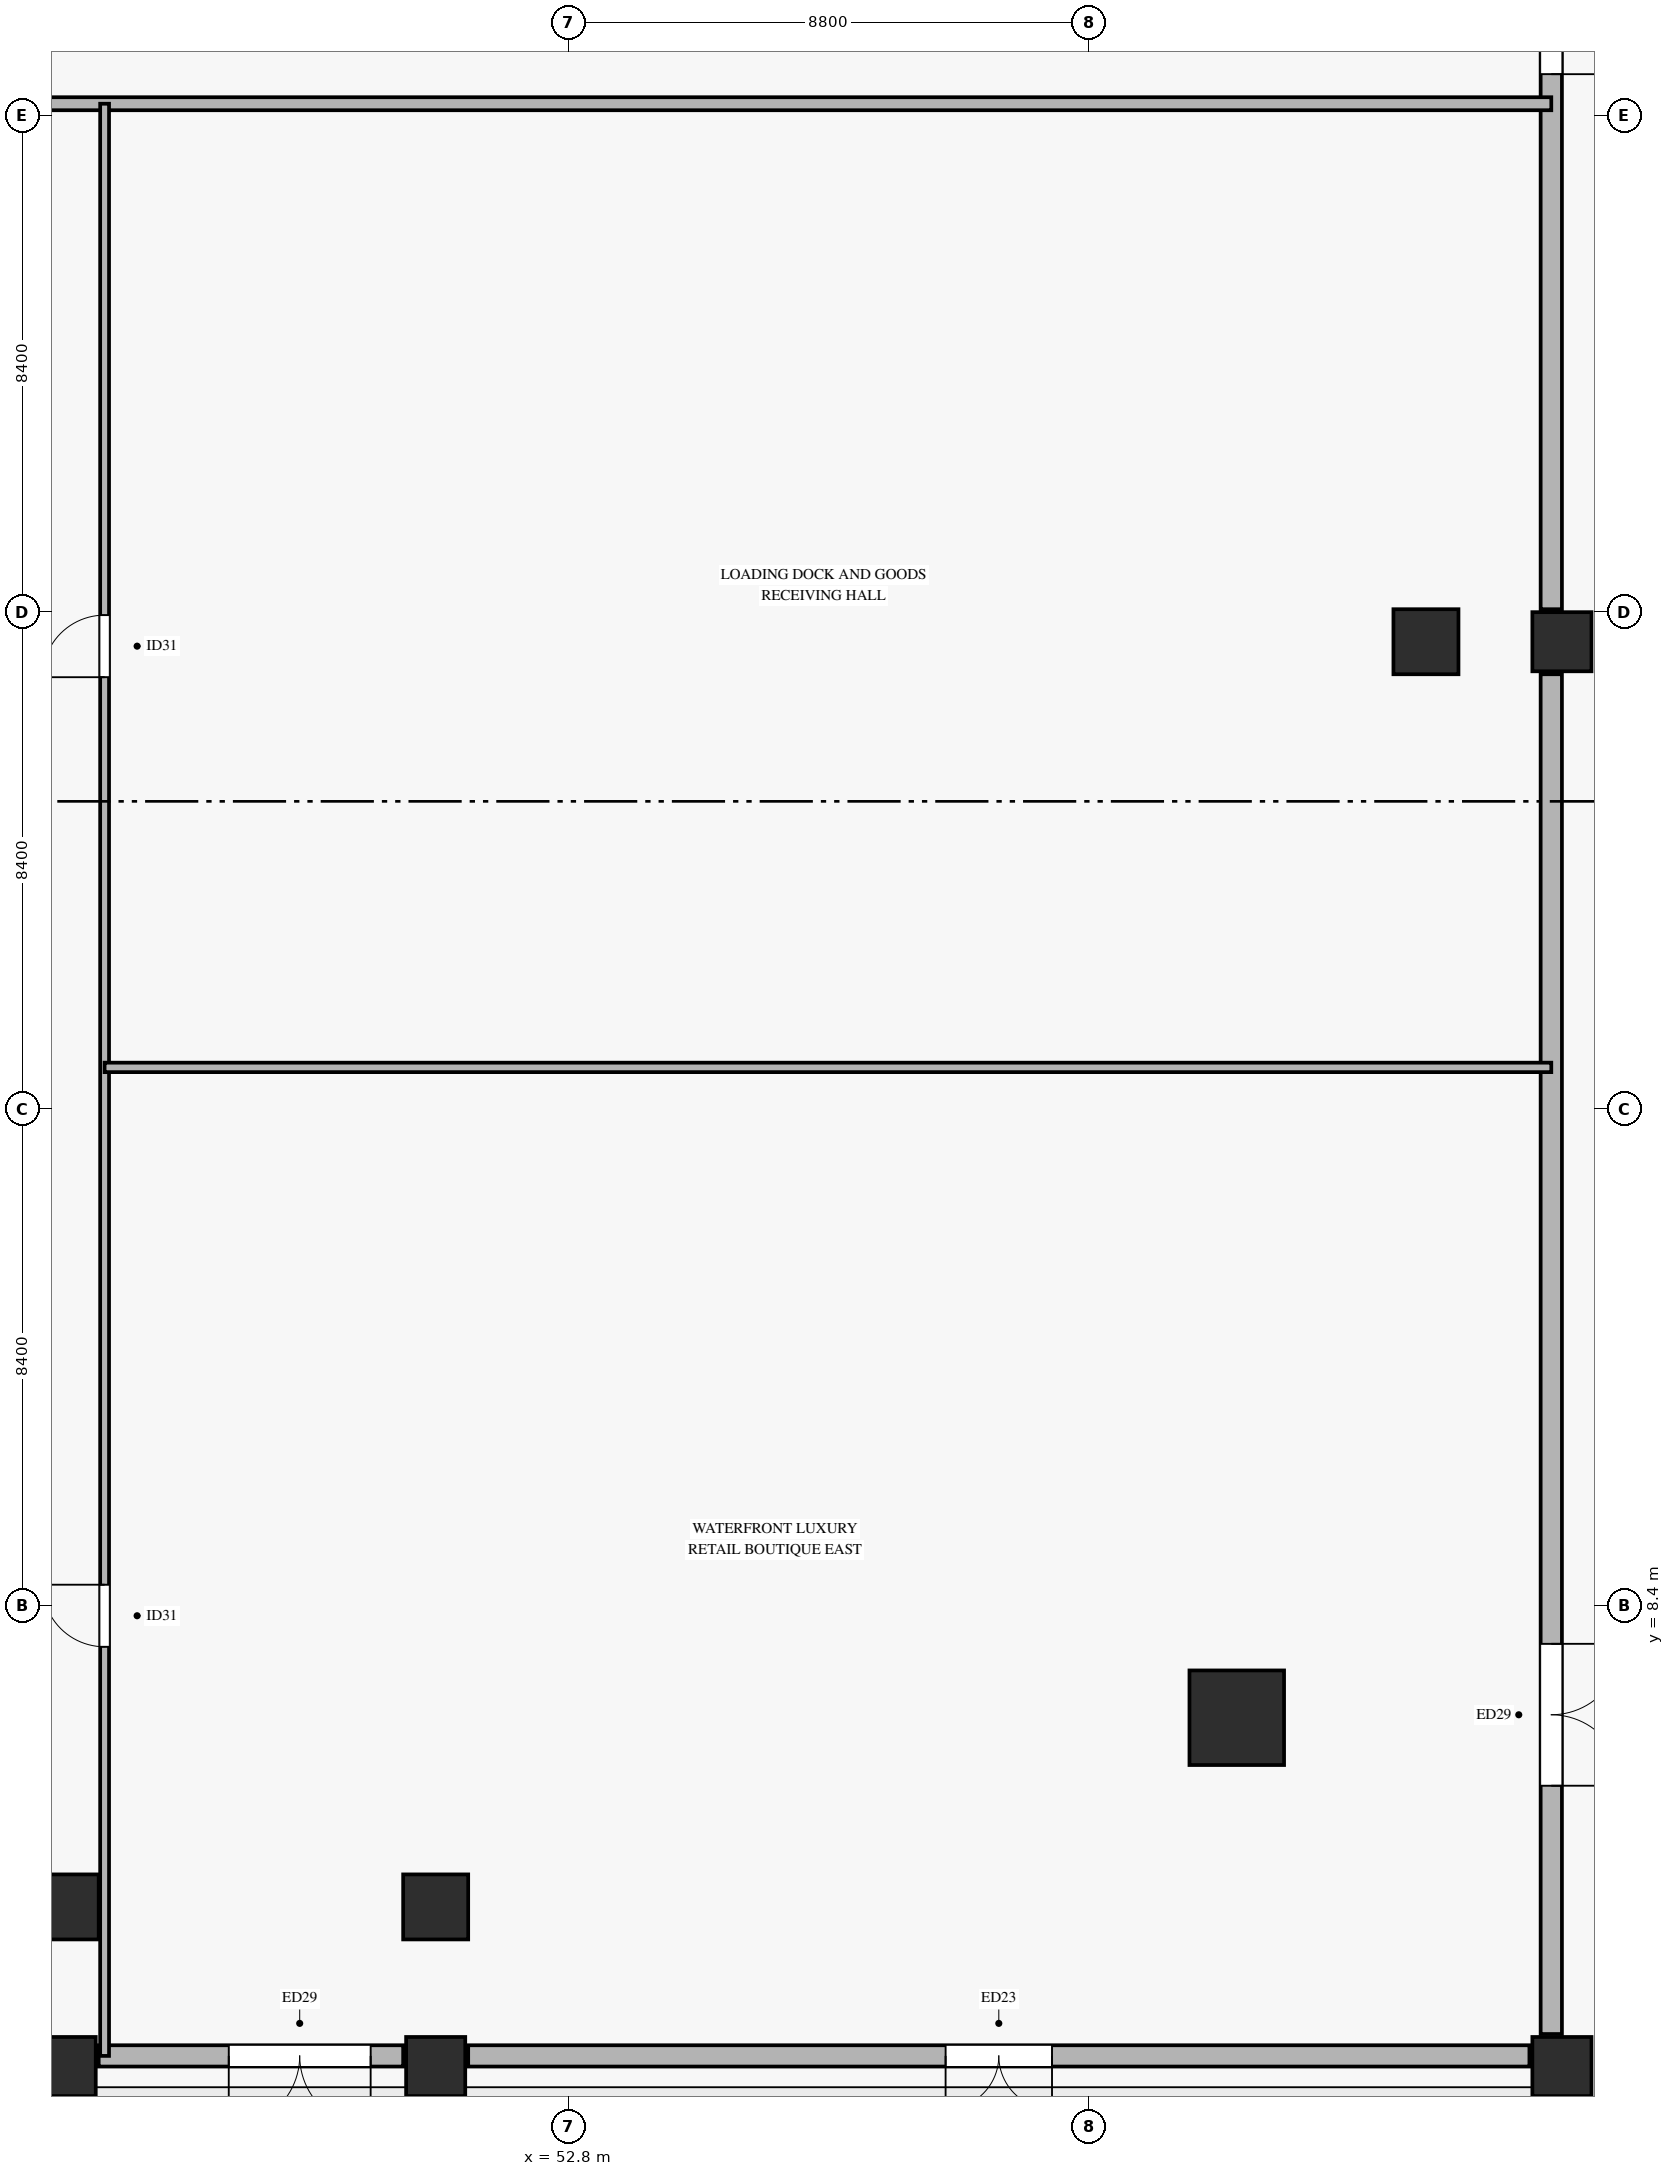
"""IFC4 building model, lengths in metres.
Left out: names, types, materials, properties, quantities, classifications, styles, units other than length and angle.
Written with IfcOpenShell. Run it as: python <this file> out.ifc"""

import sys

from ifc_helpers import new_model, si_unit, direction, frame, frame_2d, origin, origin_2d, place, context, subcontext, project, spatial, rectangle, hollow_rectangle, extrude, source, transform, mapped, element, fill, save


model = new_model("IFC4")
c1 = context("Model", 3, precision=1e-05, world=origin(), true_north=direction((0.0, 1.0)))
c2 = subcontext(c1, "Body", "Model", "MODEL_VIEW")
j1 = project(units=[si_unit("LENGTHUNIT", "METRE"), si_unit("PLANEANGLEUNIT", "RADIAN")], contexts=[c1])
p1 = place(None, origin())
s1 = spatial("IfcSite", under=j1, at=p1, CompositionType="ELEMENT")
p2 = place(p1, origin())
s2 = spatial("IfcBuilding", under=s1, at=p2, CompositionType="ELEMENT")
p3 = place(p2, origin())
s3 = spatial("IfcBuildingStorey", under=s2, at=p3, CompositionType="ELEMENT", Elevation=0.0)
m1 = source(origin(), c2, "Body", "SweptSolid", [
    extrude(hollow_rectangle(XDim=1.6, YDim=1.6, WallThickness=0.075, at=origin_2d()), origin(), (0.0, 0.0, 1.0), 5.34),
])
p4 = place(p3, frame((64.1, 6.5, 0.0), z_axis=(0.0, 0.0, 1.0), x_axis=(1.0, 0.0, 0.0)))
e1 = element("IfcColumn", 1, at=p4, inside=s3, PredefinedType="COLUMN", context=c2, shape_type="MappedRepresentation", body=[
    mapped(m1, transform((0.0, 0.0, 0.0), x_axis=(1.0, 0.0, 0.0), y_axis=(0.0, 1.0, 0.0), z_axis=(0.0, 0.0, 1.0), scale=1.0)),
])
m2 = source(origin(), c2, "Body", "SweptSolid", [
    extrude(hollow_rectangle(XDim=1.1, YDim=1.1, WallThickness=0.05, at=origin_2d()), origin(), (0.0, 0.0, 1.0), 5.34),
])
for number, where, z_axis, x_axis in (
    (2, (44.3, 3.3, 0.0), (0.0, 0.0, 1.0), (1.0, 0.0, 0.0)),
    (3, (50.55, 3.3, 0.0), (0.0, 0.0, 1.0), (1.0, 0.0, 0.0)),
    (4, (67.3, 24.7, 0.0), (0.0, 0.0, 1.0), (1.0, 0.0, 0.0)),
):
    element("IfcColumn", number, at=place(p3, frame(where, z_axis=z_axis, x_axis=x_axis)), inside=s3, PredefinedType="COLUMN", context=c2, shape_type="MappedRepresentation", body=[
        mapped(m2, transform((0.0, 0.0, 0.0), x_axis=(1.0, 0.0, 0.0), y_axis=(0.0, 1.0, 0.0), z_axis=(0.0, 0.0, 1.0), scale=1.0)),
    ])
m3 = source(origin(), c2, "Body", "SweptSolid", [
    extrude(hollow_rectangle(XDim=1.0, YDim=1.0, WallThickness=0.045, at=origin_2d()), origin(), (0.0, 0.0, 1.0), 5.34),
])
for number, where, z_axis, x_axis in (
    (5, (44.3, 0.6, 0.0), (0.0, 0.0, 1.0), (1.0, 0.0, 0.0)),
    (6, (50.55, 0.6, 0.0), (0.0, 0.0, 1.0), (1.0, 0.0, 0.0)),
    (7, (69.6, 0.6, 0.0), (0.0, 0.0, 1.0), (1.0, 0.0, 0.0)),
    (8, (69.6, 24.7, 0.0), (0.0, 0.0, 1.0), (1.0, 0.0, 0.0)),
):
    element("IfcColumn", number, at=place(p3, frame(where, z_axis=z_axis, x_axis=x_axis)), inside=s3, PredefinedType="COLUMN", context=c2, shape_type="MappedRepresentation", body=[
        mapped(m3, transform((0.0, 0.0, 0.0), x_axis=(1.0, 0.0, 0.0), y_axis=(0.0, 1.0, 0.0), z_axis=(0.0, 0.0, 1.0), scale=1.0)),
    ])
p5 = place(p3, frame((44.85, 0.78, 0.0), z_axis=(0.0, 0.0, 1.0), x_axis=(1.0, 0.0, 0.0)))
e9 = element("IfcWall", 9, at=p5, inside=s3, PredefinedType="SOLIDWALL", context=c2, shape_type="SweptSolid", body=[
    extrude(rectangle(XDim=5.15, YDim=0.36, at=frame_2d((2.575, 0.0))), origin(), (0.0, 0.0, 1.0), 4.22),
])
p6 = place(p5, frame((2.2, 0.0, 0.0)))
e10 = element("IfcOpeningElement", 10, at=p6, cuts=e9, PredefinedType="OPENING", context=c2, shape_type="SweptSolid", body=[
    extrude(rectangle(XDim=2.4, YDim=2.6, at=frame_2d((1.2, 1.3))), frame((0.0, 0.19, 0.0), z_axis=(0.0, -1.0, 0.0), x_axis=(1.0, 0.0, 0.0)), (0.0, 0.0, 1.0), 0.38),
])
p7 = place(p3, frame((51.1, 0.78, 0.0), z_axis=(0.0, 0.0, 1.0), x_axis=(1.0, 0.0, 0.0)))
e11 = element("IfcWall", 11, at=p7, inside=s3, PredefinedType="SOLIDWALL", context=c2, shape_type="SweptSolid", body=[
    extrude(rectangle(XDim=17.95, YDim=0.36, at=frame_2d((8.975, 0.0))), origin(), (0.0, 0.0, 1.0), 4.22),
])
p8 = place(p7, frame((8.075, 0.0, 0.0)))
e12 = element("IfcOpeningElement", 12, at=p8, cuts=e11, PredefinedType="OPENING", context=c2, shape_type="SweptSolid", body=[
    extrude(rectangle(XDim=1.8, YDim=2.4, at=frame_2d((0.9, 1.2))), frame((0.0, 0.19, 0.0), z_axis=(0.0, -1.0, 0.0), x_axis=(1.0, 0.0, 0.0)), (0.0, 0.0, 1.0), 0.38),
])
p9 = place(p3, frame((69.42, 1.15, 0.0), z_axis=(0.0, 0.0, 1.0), x_axis=(0.0, 1.0, 0.0)))
e13 = element("IfcWall", 13, at=p9, inside=s3, PredefinedType="SOLIDWALL", context=c2, shape_type="SweptSolid", body=[
    extrude(rectangle(XDim=23.0, YDim=0.36, at=frame_2d((11.5, 0.0))), origin(), (0.0, 0.0, 1.0), 4.22),
])
p10 = place(p9, frame((4.2, 0.0, 0.0)))
e14 = element("IfcOpeningElement", 14, at=p10, cuts=e13, PredefinedType="OPENING", context=c2, shape_type="SweptSolid", body=[
    extrude(rectangle(XDim=2.4, YDim=2.6, at=frame_2d((1.2, 1.3))), frame((0.0, 0.19, 0.0), z_axis=(0.0, -1.0, 0.0), x_axis=(1.0, 0.0, 0.0)), (0.0, 0.0, 1.0), 0.38),
])
p11 = place(p3, frame((69.42, 25.25, 0.0), z_axis=(0.0, 0.0, 1.0), x_axis=(0.0, 1.0, 0.0)))
e15 = element("IfcWall", 15, at=p11, inside=s3, PredefinedType="SOLIDWALL", context=c2, shape_type="SweptSolid", body=[
    extrude(rectangle(XDim=11.65, YDim=0.36, at=frame_2d((5.825, 0.0))), origin(), (0.0, 0.0, 1.0), 4.22),
])
p12 = place(p11, frame((9.05, 0.0, 0.0)))
e16 = element("IfcOpeningElement", 16, at=p12, cuts=e15, PredefinedType="OPENING", context=c2, shape_type="SweptSolid", body=[
    extrude(rectangle(XDim=2.4, YDim=2.6, at=frame_2d((1.2, 1.3))), frame((0.0, 0.19, 0.0), z_axis=(0.0, -1.0, 0.0), x_axis=(1.0, 0.0, 0.0)), (0.0, 0.0, 1.0), 0.38),
])
p13 = place(p3, frame((0.98, 33.8, 0.0), z_axis=(0.0, 0.0, 1.0), x_axis=(1.0, 0.0, 0.0)))
e17 = element("IfcWall", 17, at=p13, inside=s3, PredefinedType="SOLIDWALL", context=c2, shape_type="SweptSolid", body=[
    extrude(rectangle(XDim=68.44, YDim=0.22, at=frame_2d((34.22, 0.0))), origin(), (0.0, 0.0, 1.0), 4.225),
])
p14 = place(p13, frame((25.27, 0.0, 0.0)))
e18 = element("IfcOpeningElement", 18, at=p14, cuts=e17, PredefinedType="OPENING", context=c2, shape_type="SweptSolid", body=[
    extrude(rectangle(XDim=1.2, YDim=2.15, at=frame_2d((0.6, 1.075))), frame((0.0, 0.12, 0.0), z_axis=(0.0, -1.0, 0.0), x_axis=(1.0, 0.0, 0.0)), (0.0, 0.0, 1.0), 0.24),
])
p15 = place(p13, frame((38.22, 0.0, 0.0)))
e19 = element("IfcOpeningElement", 19, at=p15, cuts=e17, PredefinedType="OPENING", context=c2, shape_type="SweptSolid", body=[
    extrude(rectangle(XDim=1.2, YDim=2.15, at=frame_2d((0.6, 1.075))), frame((0.0, 0.12, 0.0), z_axis=(0.0, -1.0, 0.0), x_axis=(1.0, 0.0, 0.0)), (0.0, 0.0, 1.0), 0.24),
])
p16 = place(p13, frame((2.82, 0.0, 0.0)))
e20 = element("IfcOpeningElement", 20, at=p16, cuts=e17, PredefinedType="OPENING", context=c2, shape_type="SweptSolid", body=[
    extrude(rectangle(XDim=1.05, YDim=2.15, at=frame_2d((0.525, 1.075))), frame((0.0, 0.12, 0.0), z_axis=(0.0, -1.0, 0.0), x_axis=(1.0, 0.0, 0.0)), (0.0, 0.0, 1.0), 0.24),
])
p17 = place(p3, frame((44.95, 0.78, 0.0), z_axis=(0.0, 0.0, 1.0), x_axis=(0.0, 1.0, 0.0)))
e21 = element("IfcWall", 21, at=p17, inside=s3, PredefinedType="PARTITIONING", context=c2, shape_type="SweptSolid", body=[
    extrude(rectangle(XDim=33.02, YDim=0.15, at=frame_2d((16.51, 0.0))), origin(), (0.0, 0.0, 1.0), 4.225),
])
p18 = place(p17, frame((6.92, 0.0, 0.0)))
e22 = element("IfcOpeningElement", 22, at=p18, cuts=e21, PredefinedType="OPENING", context=c2, shape_type="SweptSolid", body=[
    extrude(rectangle(XDim=1.05, YDim=2.15, at=frame_2d((0.525, 1.075))), frame((0.0, 0.085, 0.0), z_axis=(0.0, -1.0, 0.0), x_axis=(1.0, 0.0, 0.0)), (0.0, 0.0, 1.0), 0.17),
])
p19 = place(p17, frame((23.32, 0.0, 0.0)))
e23 = element("IfcOpeningElement", 23, at=p19, cuts=e21, PredefinedType="OPENING", context=c2, shape_type="SweptSolid", body=[
    extrude(rectangle(XDim=1.05, YDim=2.15, at=frame_2d((0.525, 1.075))), frame((0.0, 0.085, 0.0), z_axis=(0.0, -1.0, 0.0), x_axis=(1.0, 0.0, 0.0)), (0.0, 0.0, 1.0), 0.17),
])
p20 = place(p3, frame((44.95, 17.5, 0.0), z_axis=(0.0, 0.0, 1.0), x_axis=(1.0, 0.0, 0.0)))
e24 = element("IfcWall", 24, at=p20, inside=s3, PredefinedType="PARTITIONING", context=c2, shape_type="SweptSolid", body=[
    extrude(rectangle(XDim=24.47, YDim=0.16, at=frame_2d((12.235, 0.0))), origin(), (0.0, 0.0, 1.0), 4.225),
])
m4 = source(origin(), c2, "Body", "SweptSolid", [
    extrude(rectangle(XDim=2.4, YDim=2.6, at=frame_2d((1.2, 1.3))), frame((0.0, 0.025, 0.0), z_axis=(0.0, -1.0, 0.0), x_axis=(1.0, 0.0, 0.0)), (0.0, 0.0, 1.0), 0.05),
])
p21 = place(p6, frame((2.4, 0.0, 0.0), z_axis=(0.0, 0.0, 1.0), x_axis=(-1.0, 0.0, 0.0)))
e25 = element("IfcDoor", 25, at=p21, inside=s3, OperationType="DOUBLE_SWING_LEFT", PredefinedType="DOOR", context=c2, shape_type="MappedRepresentation", body=[
    mapped(m4, transform((0.0, 0.0, 0.0), x_axis=(1.0, 0.0, 0.0), y_axis=(0.0, 1.0, 0.0), z_axis=(0.0, 0.0, 1.0), scale=1.0)),
])
fill(e10, e25)
m5 = source(origin(), c2, "Body", "SweptSolid", [
    extrude(rectangle(XDim=1.8, YDim=2.4, at=frame_2d((0.9, 1.2))), frame((0.0, 0.025, 0.0), z_axis=(0.0, -1.0, 0.0), x_axis=(1.0, 0.0, 0.0)), (0.0, 0.0, 1.0), 0.05),
])
p22 = place(p8, frame((1.8, 0.0, 0.0), z_axis=(0.0, 0.0, 1.0), x_axis=(-1.0, 0.0, 0.0)))
e26 = element("IfcDoor", 26, at=p22, inside=s3, OperationType="DOUBLE_SWING_RIGHT", PredefinedType="DOOR", context=c2, shape_type="MappedRepresentation", body=[
    mapped(m5, transform((0.0, 0.0, 0.0), x_axis=(1.0, 0.0, 0.0), y_axis=(0.0, 1.0, 0.0), z_axis=(0.0, 0.0, 1.0), scale=1.0)),
])
fill(e12, e26)
p23 = place(p10, frame((2.4, 0.0, 0.0), z_axis=(0.0, 0.0, 1.0), x_axis=(-1.0, 0.0, 0.0)))
e27 = element("IfcDoor", 27, at=p23, inside=s3, OperationType="DOUBLE_SWING_LEFT", PredefinedType="DOOR", context=c2, shape_type="MappedRepresentation", body=[
    mapped(m4, transform((0.0, 0.0, 0.0), x_axis=(1.0, 0.0, 0.0), y_axis=(0.0, 1.0, 0.0), z_axis=(0.0, 0.0, 1.0), scale=1.0)),
])
fill(e14, e27)
p24 = place(p12, frame((2.4, 0.0, 0.0), z_axis=(0.0, 0.0, 1.0), x_axis=(-1.0, 0.0, 0.0)))
e28 = element("IfcDoor", 28, at=p24, inside=s3, OperationType="DOUBLE_SWING_LEFT", PredefinedType="DOOR", context=c2, shape_type="MappedRepresentation", body=[
    mapped(m4, transform((0.0, 0.0, 0.0), x_axis=(1.0, 0.0, 0.0), y_axis=(0.0, 1.0, 0.0), z_axis=(0.0, 0.0, 1.0), scale=1.0)),
])
fill(e16, e28)
m6 = source(origin(), c2, "Body", "SweptSolid", [
    extrude(rectangle(XDim=1.05, YDim=2.15, at=frame_2d((0.525, 1.075))), frame((0.0, 0.025, 0.0), z_axis=(0.0, -1.0, 0.0), x_axis=(1.0, 0.0, 0.0)), (0.0, 0.0, 1.0), 0.05),
])
p25 = place(p18, origin())
e29 = element("IfcDoor", 29, at=p25, inside=s3, OperationType="SINGLE_SWING_RIGHT", PredefinedType="DOOR", context=c2, shape_type="MappedRepresentation", body=[
    mapped(m6, transform((0.0, 0.0, 0.0), x_axis=(1.0, 0.0, 0.0), y_axis=(0.0, 1.0, 0.0), z_axis=(0.0, 0.0, 1.0), scale=1.0)),
])
fill(e22, e29)
p26 = place(p19, origin())
e30 = element("IfcDoor", 30, at=p26, inside=s3, OperationType="SINGLE_SWING_LEFT", PredefinedType="DOOR", context=c2, shape_type="MappedRepresentation", body=[
    mapped(m6, transform((0.0, 0.0, 0.0), x_axis=(1.0, 0.0, 0.0), y_axis=(0.0, 1.0, 0.0), z_axis=(0.0, 0.0, 1.0), scale=1.0)),
])
fill(e23, e30)
save(model, sys.argv[1])
